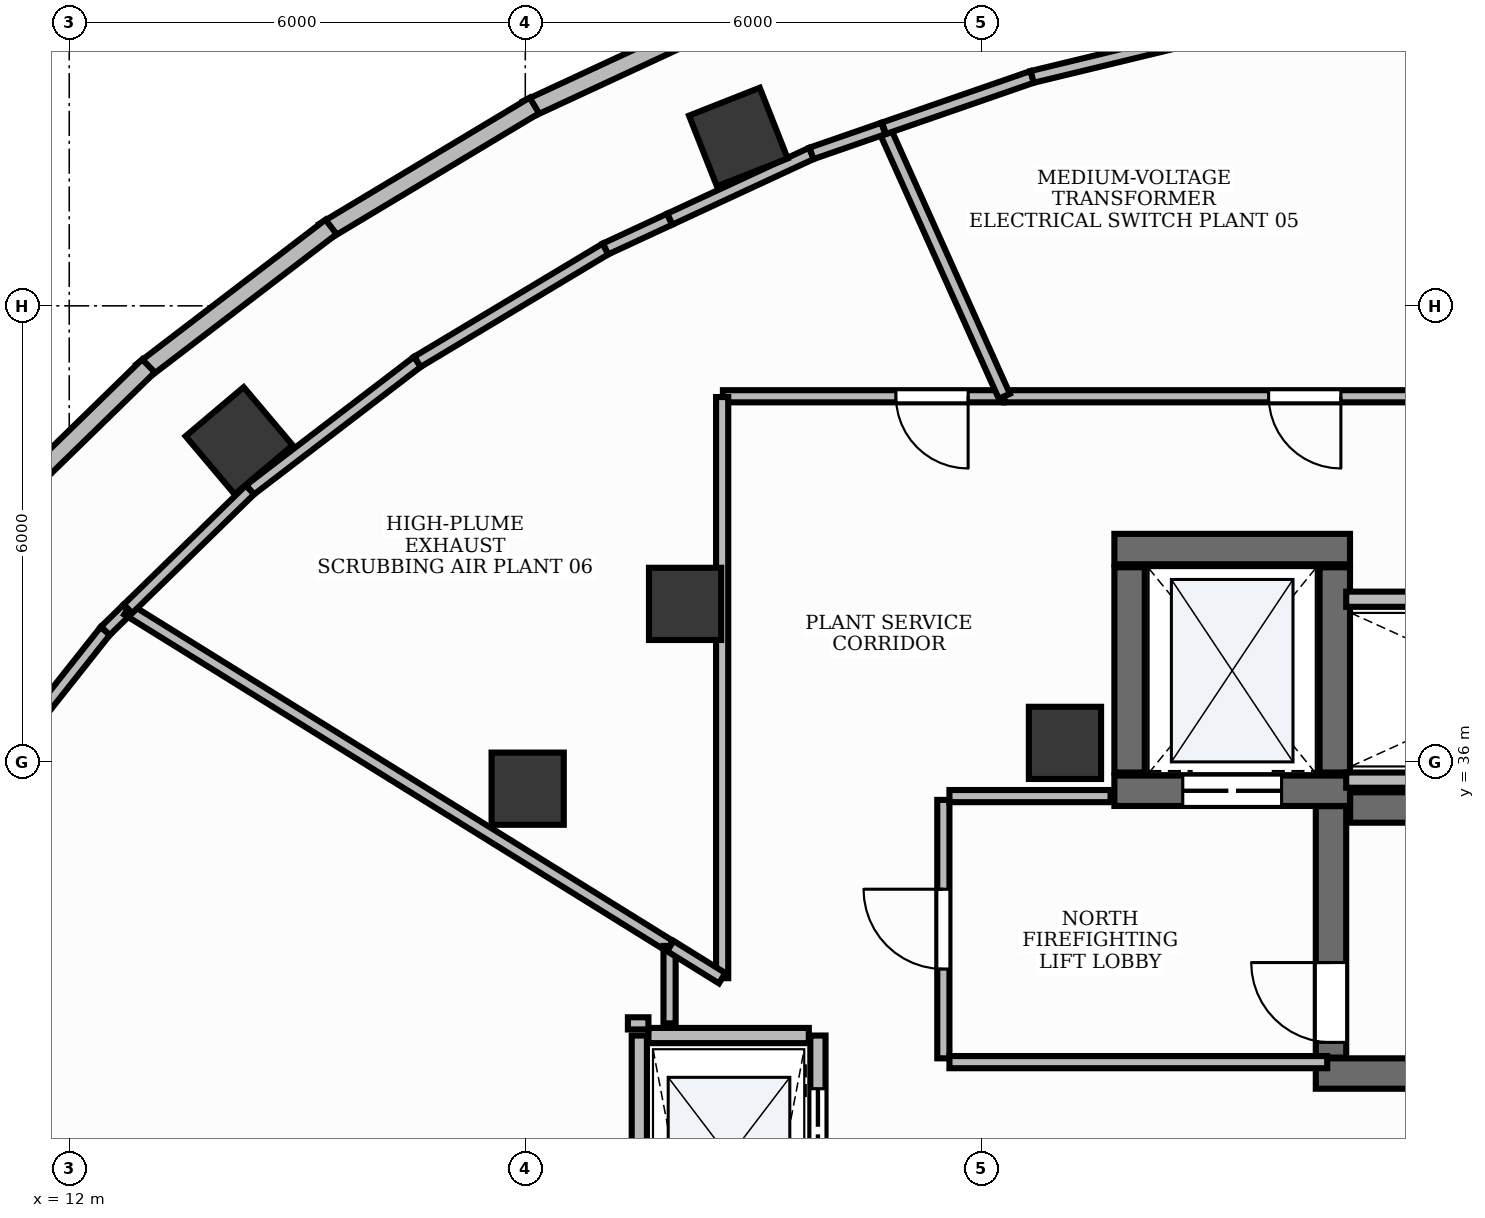
"""IFC4 building model, lengths in metres.
Left out: names, types, materials, properties, quantities, classifications, styles, units other than length and angle.
Written with IfcOpenShell. Run it as: python <this file> out.ifc"""

import sys

from ifc_helpers import new_model, si_unit, direction, frame, frame_2d, origin, origin_2d, place, context, subcontext, project, spatial, rectangle, extrude, element, fill, save


model = new_model("IFC4")
c1 = context("Model", 3, precision=1e-05, world=origin(), true_north=direction((0.0, 1.0)))
c2 = subcontext(c1, "Body", "Model", "MODEL_VIEW")
j1 = project(units=[si_unit("LENGTHUNIT", "METRE"), si_unit("PLANEANGLEUNIT", "RADIAN")], contexts=[c1])
p1 = place(None, origin())
s1 = spatial("IfcSite", under=j1, at=p1, CompositionType="ELEMENT")
p2 = place(p1, origin())
s2 = spatial("IfcBuilding", under=s1, at=p2, CompositionType="ELEMENT")
p3 = place(p2, frame((0.0, 0.0, 213.0)))
s3 = spatial("IfcBuildingStorey", under=s2, at=p3, CompositionType="ELEMENT", Elevation=213.0)
p4 = place(p3, frame((28.852, 35.4, 0.0), z_axis=(0.0, 0.0, 1.0), x_axis=(1.0, 0.0, 0.0)))
e1 = element("IfcWall", 1, at=p4, inside=s3, PredefinedType="SHEAR", context=c2, shape_type="SweptSolid", body=[
    extrude(rectangle(XDim=8.198, YDim=0.4, at=frame_2d((4.099, 0.0))), origin(), (0.0, 0.0, 1.0), 5.1),
])
p5 = place(p3, frame((28.4, 31.9, 0.0), z_axis=(0.0, 0.0, 1.0), x_axis=(1.0, 0.0, 0.0)))
e2 = element("IfcWall", 2, at=p5, inside=s3, PredefinedType="SHEAR", context=c2, shape_type="SweptSolid", body=[
    extrude(rectangle(XDim=8.65, YDim=0.4, at=frame_2d((4.325, 0.0))), origin(), (0.0, 0.0, 1.0), 5.1),
])
p6 = place(p3, frame((28.6, 32.11, 0.0), z_axis=(0.0, 0.0, 1.0), x_axis=(0.0, 1.0, 0.0)))
e3 = element("IfcWall", 3, at=p6, inside=s3, PredefinedType="SHEAR", context=c2, shape_type="SweptSolid", body=[
    extrude(rectangle(XDim=3.308, YDim=0.4, at=frame_2d((1.654, 0.0))), origin(), (0.0, 0.0, 1.0), 5.1),
])
p7 = place(p6, frame((0.2, 0.0, 0.0)))
e4 = element("IfcOpeningElement", 4, at=p7, cuts=e3, PredefinedType="OPENING", context=c2, shape_type="SweptSolid", body=[
    extrude(rectangle(XDim=1.05, YDim=2.15, at=frame_2d((0.525, 1.075))), frame((0.0, 0.215, 0.0), z_axis=(0.0, -1.0, 0.0), x_axis=(1.0, 0.0, 0.0)), (0.0, 0.0, 1.0), 0.43),
])
p8 = place(p3, frame((25.75, 38.8, 0.0), z_axis=(0.0, 0.0, 1.0), x_axis=(1.0, 0.0, 0.0)))
e5 = element("IfcWall", 5, at=p8, inside=s3, PredefinedType="SHEAR", context=c2, shape_type="SweptSolid", body=[
    extrude(rectangle(XDim=3.1, YDim=0.4, at=frame_2d((1.55, 0.0))), origin(), (0.0, 0.0, 1.0), 5.1),
])
p9 = place(p3, frame((25.75, 35.62, 0.0), z_axis=(0.0, 0.0, 1.0), x_axis=(1.0, 0.0, 0.0)))
e6 = element("IfcWall", 6, at=p9, inside=s3, PredefinedType="SHEAR", context=c2, shape_type="SweptSolid", body=[
    extrude(rectangle(XDim=3.1, YDim=0.4, at=frame_2d((1.55, 0.0))), origin(), (0.0, 0.0, 1.0), 5.1),
])
p10 = place(p9, frame((0.9, 0.0, 0.0)))
e7 = element("IfcOpeningElement", 7, at=p10, cuts=e6, PredefinedType="OPENING", context=c2, shape_type="SweptSolid", body=[
    extrude(rectangle(XDim=1.3, YDim=2.2, at=frame_2d((0.65, 1.1))), frame((0.0, 0.215, 0.0), z_axis=(0.0, -1.0, 0.0), x_axis=(1.0, 0.0, 0.0)), (0.0, 0.0, 1.0), 0.43),
])
for number, where, z_axis, x_axis in (
    (8, (25.95, 35.86, 0.0), (0.0, 0.0, 1.0), (0.0, 1.0, 0.0)),
    (9, (28.65, 35.86, 0.0), (0.0, 0.0, 1.0), (0.0, 1.0, 0.0)),
):
    element("IfcWall", number, at=place(p3, frame(where, z_axis=z_axis, x_axis=x_axis)), inside=s3, PredefinedType="SHEAR", context=c2, shape_type="SweptSolid", body=[
        extrude(rectangle(XDim=2.7, YDim=0.4, at=frame_2d((1.35, 0.0))), origin(), (0.0, 0.0, 1.0), 5.1),
    ])
p11 = place(p3, frame((25.1, 36.25, -0.0), z_axis=(0.0, 0.0, 1.0), x_axis=(1.0, 0.0, 0.0)))
e10 = element("IfcColumn", 10, at=p11, inside=s3, PredefinedType="PILASTER", context=c2, shape_type="SweptSolid", body=[
    extrude(rectangle(XDim=0.95, YDim=0.95, at=origin_2d()), origin(), (0.0, 0.0, 1.0), 5.101),
])
for number, where, z_axis, x_axis in (
    (11, (20.803, 44.22, -0.0), (0.0, 0.0, 1.0), (0.93, 0.367, 0.0)),
    (12, (14.235, 40.225, -0.0), (0.0, 0.0, 1.0), (0.764, 0.645, 0.0)),
):
    element("IfcColumn", number, at=place(p3, frame(where, z_axis=z_axis, x_axis=x_axis)), inside=s3, PredefinedType="COLUMN", context=c2, shape_type="SweptSolid", body=[
        extrude(rectangle(XDim=1.0, YDim=1.0, at=origin_2d()), origin(), (0.0, 0.0, 1.0), 5.101),
    ])
for number, where, z_axis, x_axis in (
    (13, (20.102, 38.079, -0.0), (0.0, 0.0, 1.0), (1.0, 0.0, 0.0)),
    (14, (18.031, 35.647, -0.0), (0.0, 0.0, 1.0), (1.0, 0.0, 0.0)),
):
    element("IfcColumn", number, at=place(p3, frame(where, z_axis=z_axis, x_axis=x_axis)), inside=s3, PredefinedType="COLUMN", context=c2, shape_type="SweptSolid", body=[
        extrude(rectangle(XDim=0.95, YDim=0.95, at=origin_2d()), origin(), (0.0, 0.0, 1.0), 5.101),
    ])
p12 = place(p3, frame((21.028, 45.979, 0.0), z_axis=(0.0, 0.0, 1.0), x_axis=(-0.907160542428, -0.420784683967, 0.0)))
e15 = element("IfcWall", 15, at=p12, inside=s3, PredefinedType="STANDARD", context=c2, shape_type="SweptSolid", body=[
    extrude(rectangle(XDim=3.316, YDim=0.24, at=frame_2d((1.658, 0.0))), origin(), (0.0, 0.0, 1.0), 3.425),
])
p13 = place(p3, frame((18.119, 44.635, 0.0), z_axis=(0.0, 0.0, 1.0), x_axis=(-0.857559644275, -0.514384541478, 0.0)))
e16 = element("IfcWall", 16, at=p13, inside=s3, PredefinedType="STANDARD", context=c2, shape_type="SweptSolid", body=[
    extrude(rectangle(XDim=3.229, YDim=0.24, at=frame_2d((1.614, 0.0))), origin(), (0.0, 0.0, 1.0), 3.825),
])
p14 = place(p3, frame((15.445, 43.038, 0.0), z_axis=(0.0, 0.0, 1.0), x_axis=(-0.794391016962, -0.607406710673, 0.0)))
e17 = element("IfcWall", 17, at=p14, inside=s3, PredefinedType="STANDARD", context=c2, shape_type="SweptSolid", body=[
    extrude(rectangle(XDim=3.132, YDim=0.24, at=frame_2d((1.566, 0.0))), origin(), (0.0, 0.0, 1.0), 3.825),
])
p15 = place(p3, frame((13.043, 41.21, 0.0), z_axis=(0.0, 0.0, 1.0), x_axis=(-0.716024277957, -0.698075378004, 0.0)))
e18 = element("IfcWall", 18, at=p15, inside=s3, PredefinedType="STANDARD", context=c2, shape_type="SweptSolid", body=[
    extrude(rectangle(XDim=3.033, YDim=0.24, at=frame_2d((1.517, 0.0))), origin(), (0.0, 0.0, 1.0), 3.425),
])
p16 = place(p3, frame((19.5, 21.6, 0.0), z_axis=(0.0, 0.0, 1.0), x_axis=(0.0, 1.0, 0.0)))
e19 = element("IfcWall", 19, at=p16, inside=s3, PredefinedType="PARTITIONING", context=c2, shape_type="SweptSolid", body=[
    extrude(rectangle(XDim=10.8, YDim=0.2, at=frame_2d((5.4, 0.0))), origin(), (0.0, 0.0, 1.0), 3.41),
])
p17 = place(p3, frame((21.85, 21.6, 0.0), z_axis=(0.0, 0.0, 1.0), x_axis=(0.0, 1.0, 0.0)))
e20 = element("IfcWall", 20, at=p17, inside=s3, PredefinedType="PARTITIONING", context=c2, shape_type="SweptSolid", body=[
    extrude(rectangle(XDim=10.8, YDim=0.2, at=frame_2d((5.4, 0.0))), origin(), (0.0, 0.0, 1.0), 3.41),
])
p18 = place(p17, frame((0.9, 0.0, 0.0)))
e21 = element("IfcOpeningElement", 21, at=p18, cuts=e20, PredefinedType="OPENING", context=c2, shape_type="SweptSolid", body=[
    extrude(rectangle(XDim=1.1, YDim=2.2, at=frame_2d((0.55, 1.1))), frame((0.0, 0.115, 0.0), z_axis=(0.0, -1.0, 0.0), x_axis=(1.0, 0.0, 0.0)), (0.0, 0.0, 1.0), 0.23),
])
p19 = place(p17, frame((3.6, 0.0, 0.0)))
e22 = element("IfcOpeningElement", 22, at=p19, cuts=e20, PredefinedType="OPENING", context=c2, shape_type="SweptSolid", body=[
    extrude(rectangle(XDim=1.1, YDim=2.2, at=frame_2d((0.55, 1.1))), frame((0.0, 0.115, 0.0), z_axis=(0.0, -1.0, 0.0), x_axis=(1.0, 0.0, 0.0)), (0.0, 0.0, 1.0), 0.23),
])
p20 = place(p17, frame((6.3, 0.0, 0.0)))
e23 = element("IfcOpeningElement", 23, at=p20, cuts=e20, PredefinedType="OPENING", context=c2, shape_type="SweptSolid", body=[
    extrude(rectangle(XDim=1.1, YDim=2.2, at=frame_2d((0.55, 1.1))), frame((0.0, 0.115, 0.0), z_axis=(0.0, -1.0, 0.0), x_axis=(1.0, 0.0, 0.0)), (0.0, 0.0, 1.0), 0.23),
])
p21 = place(p17, frame((9.0, 0.0, 0.0)))
e24 = element("IfcOpeningElement", 24, at=p21, cuts=e20, PredefinedType="OPENING", context=c2, shape_type="SweptSolid", body=[
    extrude(rectangle(XDim=1.1, YDim=2.2, at=frame_2d((0.55, 1.1))), frame((0.0, 0.115, 0.0), z_axis=(0.0, -1.0, 0.0), x_axis=(1.0, 0.0, 0.0)), (0.0, 0.0, 1.0), 0.23),
])
p22 = place(p3, frame((19.62, 32.4, 0.0), z_axis=(0.0, 0.0, 1.0), x_axis=(1.0, 0.0, 0.0)))
e25 = element("IfcWall", 25, at=p22, inside=s3, PredefinedType="PARTITIONING", context=c2, shape_type="SweptSolid", body=[
    extrude(rectangle(XDim=2.11, YDim=0.2, at=frame_2d((1.055, 0.0))), origin(), (0.0, 0.0, 1.0), 3.41),
])
for number, where, z_axis, x_axis in (
    (26, (28.8, 35.76, 0.0), (0.0, 0.0, 1.0), (1.0, 0.0, 0.0)),
    (27, (28.8, 38.14, 0.0), (0.0, 0.0, 1.0), (1.0, 0.0, 0.0)),
):
    element("IfcWall", number, at=place(p3, frame(where, z_axis=z_axis, x_axis=x_axis)), inside=s3, PredefinedType="PARTITIONING", context=c2, shape_type="SweptSolid", body=[
        extrude(rectangle(XDim=4.57, YDim=0.2, at=frame_2d((2.285, 0.0))), origin(), (0.0, 0.0, 1.0), 3.41),
    ])
p23 = place(p3, frame((23.5, 32.1, 0.0), z_axis=(0.0, 0.0, 1.0), x_axis=(0.0, 1.0, 0.0)))
e28 = element("IfcWall", 28, at=p23, inside=s3, PredefinedType="PARTITIONING", context=c2, shape_type="SweptSolid", body=[
    extrude(rectangle(XDim=3.4, YDim=0.16, at=frame_2d((1.7, 0.0))), origin(), (0.0, 0.0, 1.0), 3.41),
])
p24 = place(p23, frame((1.175, 0.0, 0.0)))
e29 = element("IfcOpeningElement", 29, at=p24, cuts=e28, PredefinedType="OPENING", context=c2, shape_type="SweptSolid", body=[
    extrude(rectangle(XDim=1.05, YDim=2.15, at=frame_2d((0.525, 1.075))), frame((0.0, 0.095, 0.0), z_axis=(0.0, -1.0, 0.0), x_axis=(1.0, 0.0, 0.0)), (0.0, 0.0, 1.0), 0.19),
])
p25 = place(p3, frame((23.58, 32.05, 0.0), z_axis=(0.0, 0.0, 1.0), x_axis=(1.0, 0.0, 0.0)))
e30 = element("IfcWall", 30, at=p25, inside=s3, PredefinedType="PARTITIONING", context=c2, shape_type="SweptSolid", body=[
    extrude(rectangle(XDim=4.97, YDim=0.16, at=frame_2d((2.485, 0.0))), origin(), (0.0, 0.0, 1.0), 3.41),
])
p26 = place(p3, frame((23.58, 35.55, 0.0), z_axis=(0.0, 0.0, 1.0), x_axis=(1.0, 0.0, 0.0)))
e31 = element("IfcWall", 31, at=p26, inside=s3, PredefinedType="PARTITIONING", context=c2, shape_type="SweptSolid", body=[
    extrude(rectangle(XDim=2.12, YDim=0.16, at=frame_2d((1.06, 0.0))), origin(), (0.0, 0.0, 1.0), 3.41),
])
p27 = place(p3, frame((31.34, 40.81, 0.0), z_axis=(0.0, 0.0, 1.0), x_axis=(-1.0, 0.0, 0.0)))
e32 = element("IfcWall", 32, at=p27, inside=s3, PredefinedType="PARTITIONING", context=c2, shape_type="SweptSolid", body=[
    extrude(rectangle(XDim=7.038, YDim=0.16, at=frame_2d((3.519, 0.0))), origin(), (0.0, 0.0, 1.0), 3.41),
])
p28 = place(p27, frame((2.61, 0.0, 0.0)))
e33 = element("IfcOpeningElement", 33, at=p28, cuts=e32, PredefinedType="OPENING", context=c2, shape_type="SweptSolid", body=[
    extrude(rectangle(XDim=0.95, YDim=2.15, at=frame_2d((0.475, 1.075))), frame((0.0, 0.095, 0.0), z_axis=(0.0, -1.0, 0.0), x_axis=(1.0, 0.0, 0.0)), (0.0, 0.0, 1.0), 0.19),
])
p29 = place(p3, frame((24.292, 40.81, 0.0), z_axis=(0.0, 0.0, 1.0), x_axis=(-1.0, 0.0, 0.0)))
e34 = element("IfcWall", 34, at=p29, inside=s3, PredefinedType="PARTITIONING", context=c2, shape_type="SweptSolid", body=[
    extrude(rectangle(XDim=3.691, YDim=0.16, at=frame_2d((1.846, 0.0))), origin(), (0.0, 0.0, 1.0), 3.41),
])
p30 = place(p29, frame((0.466, 0.0, 0.0)))
e35 = element("IfcOpeningElement", 35, at=p30, cuts=e34, PredefinedType="OPENING", context=c2, shape_type="SweptSolid", body=[
    extrude(rectangle(XDim=0.95, YDim=2.15, at=frame_2d((0.475, 1.075))), frame((0.0, 0.095, 0.0), z_axis=(0.0, -1.0, 0.0), x_axis=(1.0, 0.0, 0.0)), (0.0, 0.0, 1.0), 0.19),
])
p31 = place(p3, frame((10.896, 35.731, 0.0), z_axis=(0.0, 0.0, 1.0), x_axis=(0.620845620269, 0.783932851584, 0.0)))
e36 = element("IfcWall", 36, at=p31, inside=s3, PredefinedType="PARTITIONING", context=c2, shape_type="SweptSolid", body=[
    extrude(rectangle(XDim=2.542, YDim=0.16, at=frame_2d((1.271, 0.0))), origin(), (0.0, 0.0, 1.0), 3.41),
])
p32 = place(p3, frame((12.475, 37.724, 0.0), z_axis=(0.0, 0.0, 1.0), x_axis=(0.716082918314, 0.698015224833, 0.0)))
e37 = element("IfcWall", 37, at=p32, inside=s3, PredefinedType="PARTITIONING", context=c2, shape_type="SweptSolid", body=[
    extrude(rectangle(XDim=0.405, YDim=0.16, at=frame_2d((0.203, 0.0))), origin(), (0.0, 0.0, 1.0), 3.41),
])
p33 = place(p3, frame((12.765, 38.007, 0.0), z_axis=(0.0, 0.0, 1.0), x_axis=(0.849598824843, -0.527429461469, 0.0)))
e38 = element("IfcWall", 38, at=p33, inside=s3, PredefinedType="PARTITIONING", context=c2, shape_type="SweptSolid", body=[
    extrude(rectangle(XDim=8.395, YDim=0.16, at=frame_2d((4.198, 0.0))), origin(), (0.0, 0.0, 1.0), 3.41),
])
p34 = place(p3, frame((19.898, 33.579, 0.0), z_axis=(0.0, 0.0, 1.0), x_axis=(0.0, -1.0, 0.0)))
e39 = element("IfcWall", 39, at=p34, inside=s3, PredefinedType="PARTITIONING", context=c2, shape_type="SweptSolid", body=[
    extrude(rectangle(XDim=1.019, YDim=0.16, at=frame_2d((0.509, 0.0))), origin(), (0.0, 0.0, 1.0), 3.41),
])
p35 = place(p3, frame((19.62, 32.56, 0.0), z_axis=(0.0, 0.0, 1.0), x_axis=(-1.0, 0.0, 0.0)))
e40 = element("IfcWall", 40, at=p35, inside=s3, PredefinedType="PARTITIONING", context=c2, shape_type="SweptSolid", body=[
    extrude(rectangle(XDim=0.27, YDim=0.16, at=frame_2d((0.135, 0.0))), origin(), (0.0, 0.0, 1.0), 3.41),
])
p36 = place(p3, frame((24.302, 40.81, 0.0), z_axis=(0.0, 0.0, 1.0), x_axis=(-0.409558218272, 0.912283983114, 0.0)))
e41 = element("IfcWall", 41, at=p36, inside=s3, PredefinedType="PARTITIONING", context=c2, shape_type="SweptSolid", body=[
    extrude(rectangle(XDim=3.865, YDim=0.16, at=frame_2d((1.933, 0.0))), origin(), (0.0, 0.0, 1.0), 3.41),
])
p37 = place(p3, frame((22.719, 44.336, 0.0), z_axis=(0.0, 0.0, 1.0), x_axis=(0.944828385258, 0.327565752805, 0.0)))
e42 = element("IfcWall", 42, at=p37, inside=s3, PredefinedType="PARTITIONING", context=c2, shape_type="SweptSolid", body=[
    extrude(rectangle(XDim=2.063, YDim=0.16, at=frame_2d((1.031, 0.0))), origin(), (0.0, 0.0, 1.0), 3.41),
])
p38 = place(p3, frame((24.669, 45.012, 0.0), z_axis=(0.0, 0.0, 1.0), x_axis=(0.97202349175, 0.234883655211, 0.0)))
e43 = element("IfcWall", 43, at=p38, inside=s3, PredefinedType="PARTITIONING", context=c2, shape_type="SweptSolid", body=[
    extrude(rectangle(XDim=3.141, YDim=0.16, at=frame_2d((1.571, 0.0))), origin(), (0.0, 0.0, 1.0), 3.41),
])
p39 = place(p3, frame((14.378, 39.579, 0.0), z_axis=(0.0, 0.0, 1.0), x_axis=(0.794377819554, 0.607423970387, 0.0)))
e44 = element("IfcWall", 44, at=p39, inside=s3, PredefinedType="PARTITIONING", context=c2, shape_type="SweptSolid", body=[
    extrude(rectangle(XDim=2.774, YDim=0.16, at=frame_2d((1.387, 0.0))), origin(), (0.0, 0.0, 1.0), 3.41),
])
p40 = place(p3, frame((16.581, 41.264, 0.0), z_axis=(0.0, 0.0, 1.0), x_axis=(0.857492925713, 0.514495755428, 0.0)))
e45 = element("IfcWall", 45, at=p40, inside=s3, PredefinedType="PARTITIONING", context=c2, shape_type="SweptSolid", body=[
    extrude(rectangle(XDim=2.885, YDim=0.16, at=frame_2d((1.443, 0.0))), origin(), (0.0, 0.0, 1.0), 3.41),
])
p41 = place(p3, frame((19.056, 42.749, 0.0), z_axis=(0.0, 0.0, 1.0), x_axis=(0.90714167255, 0.420825362737, 0.0)))
e46 = element("IfcWall", 46, at=p41, inside=s3, PredefinedType="PARTITIONING", context=c2, shape_type="SweptSolid", body=[
    extrude(rectangle(XDim=0.928, YDim=0.16, at=frame_2d((0.464, 0.0))), origin(), (0.0, 0.0, 1.0), 3.41),
])
p42 = place(p3, frame((19.902, 43.141, 0.0), z_axis=(0.0, 0.0, 1.0), x_axis=(0.907143514613, 0.420821391918, 0.0)))
e47 = element("IfcWall", 47, at=p42, inside=s3, PredefinedType="PARTITIONING", context=c2, shape_type="SweptSolid", body=[
    extrude(rectangle(XDim=2.054, YDim=0.16, at=frame_2d((1.027, 0.0))), origin(), (0.0, 0.0, 1.0), 3.41),
])
p43 = place(p3, frame((21.765, 44.006, 0.0), z_axis=(0.0, 0.0, 1.0), x_axis=(0.944855343149, 0.32748798531, 0.0)))
e48 = element("IfcWall", 48, at=p43, inside=s3, PredefinedType="PARTITIONING", context=c2, shape_type="SweptSolid", body=[
    extrude(rectangle(XDim=1.0, YDim=0.16, at=frame_2d((0.5, 0.0))), origin(), (0.0, 0.0, 1.0), 3.41),
])
p44 = place(p3, frame((20.59, 40.8, 0.0), z_axis=(0.0, 0.0, 1.0), x_axis=(0.0, -1.0, 0.0)))
e49 = element("IfcWall", 49, at=p44, inside=s3, PredefinedType="PARTITIONING", context=c2, shape_type="SweptSolid", body=[
    extrude(rectangle(XDim=7.646, YDim=0.16, at=frame_2d((3.823, 0.0))), origin(), (0.0, 0.0, 1.0), 3.41),
])
p45 = place(p3, frame((20.59, 33.154, 0.0), z_axis=(0.0, 0.0, 1.0), x_axis=(-0.849804602679, 0.52709784411, 0.0)))
e50 = element("IfcWall", 50, at=p45, inside=s3, PredefinedType="PARTITIONING", context=c2, shape_type="SweptSolid", body=[
    extrude(rectangle(XDim=0.803, YDim=0.16, at=frame_2d((0.401, 0.0))), origin(), (0.0, 0.0, 1.0), 3.41),
])
p46 = place(p3, frame((12.773, 38.014, 0.0), z_axis=(0.0, 0.0, 1.0), x_axis=(0.715982444294, 0.698118284722, 0.0)))
e51 = element("IfcWall", 51, at=p46, inside=s3, PredefinedType="PARTITIONING", context=c2, shape_type="SweptSolid", body=[
    extrude(rectangle(XDim=2.241, YDim=0.16, at=frame_2d((1.121, 0.0))), origin(), (0.0, 0.0, 1.0), 3.41),
])
p47 = place(p7, origin())
e52 = element("IfcDoor", 52, at=p47, inside=s3, OperationType="SINGLE_SWING_RIGHT", PredefinedType="DOOR", context=c2, shape_type="SweptSolid", body=[
    extrude(rectangle(XDim=1.05, YDim=2.15, at=frame_2d((0.525, 1.075))), frame((0.0, 0.025, 0.0), z_axis=(0.0, -1.0, 0.0), x_axis=(1.0, 0.0, 0.0)), (0.0, 0.0, 1.0), 0.05),
])
fill(e4, e52)
p48 = place(p21, origin())
e53 = element("IfcDoor", 53, at=p48, inside=s3, OperationType="DOUBLE_DOOR_SLIDING", PredefinedType="DOOR", context=c2, shape_type="SweptSolid", body=[
    extrude(rectangle(XDim=1.1, YDim=2.2, at=frame_2d((0.55, 1.1))), frame((0.0, 0.025, 0.0), z_axis=(0.0, -1.0, 0.0), x_axis=(1.0, 0.0, 0.0)), (0.0, 0.0, 1.0), 0.05),
])
fill(e24, e53)
p49 = place(p10, origin())
e54 = element("IfcDoor", 54, at=p49, inside=s3, OperationType="DOUBLE_DOOR_SLIDING", PredefinedType="DOOR", context=c2, shape_type="SweptSolid", body=[
    extrude(rectangle(XDim=1.3, YDim=2.2, at=frame_2d((0.65, 1.1))), frame((0.0, 0.025, 0.0), z_axis=(0.0, -1.0, 0.0), x_axis=(1.0, 0.0, 0.0)), (0.0, 0.0, 1.0), 0.05),
])
fill(e7, e54)
p50 = place(p24, origin())
e55 = element("IfcDoor", 55, at=p50, inside=s3, OperationType="SINGLE_SWING_RIGHT", PredefinedType="DOOR", context=c2, shape_type="SweptSolid", body=[
    extrude(rectangle(XDim=1.05, YDim=2.15, at=frame_2d((0.525, 1.075))), frame((0.0, 0.025, 0.0), z_axis=(0.0, -1.0, 0.0), x_axis=(1.0, 0.0, 0.0)), (0.0, 0.0, 1.0), 0.05),
])
fill(e29, e55)
p51 = place(p28, origin())
e56 = element("IfcDoor", 56, at=p51, inside=s3, OperationType="SINGLE_SWING_LEFT", PredefinedType="DOOR", context=c2, shape_type="SweptSolid", body=[
    extrude(rectangle(XDim=0.95, YDim=2.15, at=frame_2d((0.475, 1.075))), frame((0.0, 0.025, 0.0), z_axis=(0.0, -1.0, 0.0), x_axis=(1.0, 0.0, 0.0)), (0.0, 0.0, 1.0), 0.05),
])
fill(e33, e56)
p52 = place(p30, origin())
e57 = element("IfcDoor", 57, at=p52, inside=s3, OperationType="SINGLE_SWING_LEFT", PredefinedType="DOOR", context=c2, shape_type="SweptSolid", body=[
    extrude(rectangle(XDim=0.95, YDim=2.15, at=frame_2d((0.475, 1.075))), frame((0.0, 0.025, 0.0), z_axis=(0.0, -1.0, 0.0), x_axis=(1.0, 0.0, 0.0)), (0.0, 0.0, 1.0), 0.05),
])
fill(e35, e57)
save(model, sys.argv[1])
